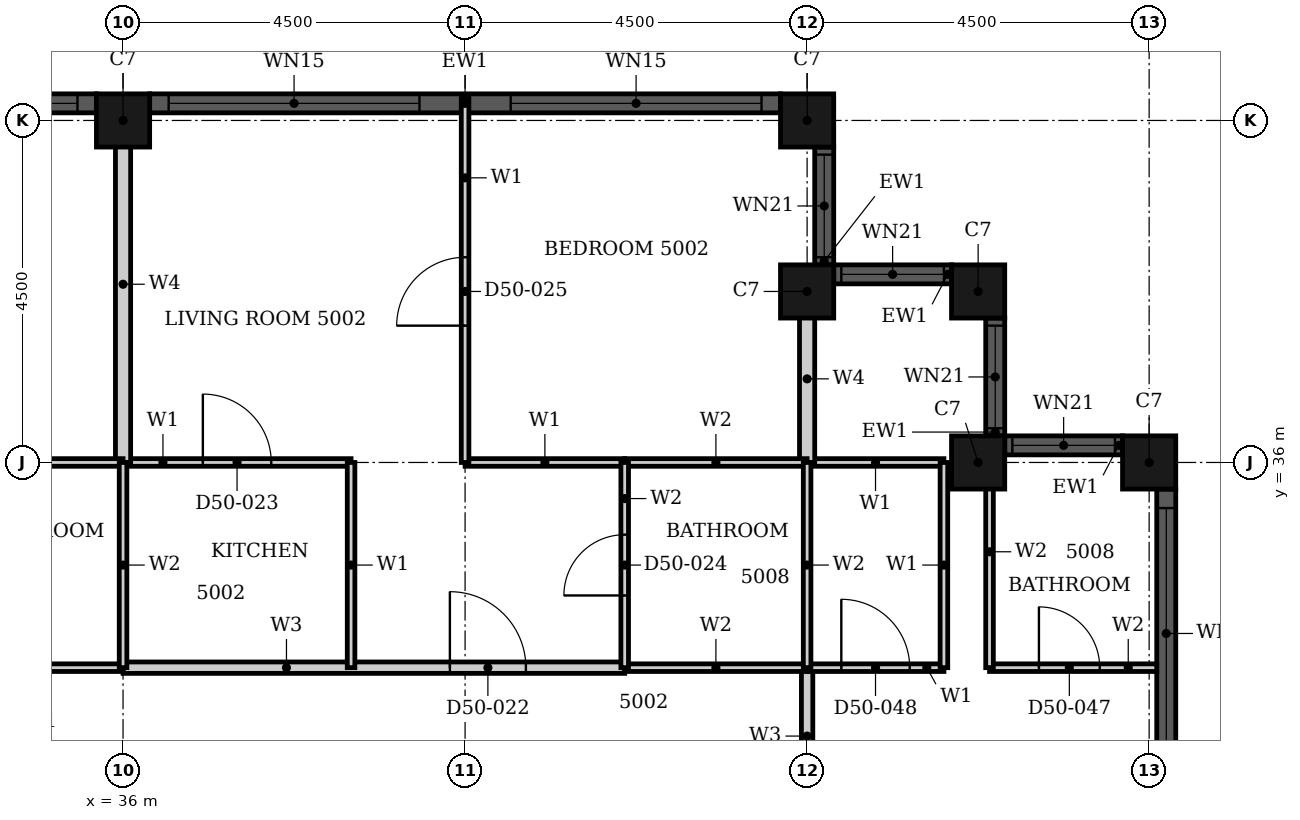
"""IFC4 building model, lengths in metres.
Left out: names, types, materials, properties, quantities, classifications, styles, units other than length and angle.
Written with IfcOpenShell. Run it as: python <this file> out.ifc"""

import sys

from ifc_helpers import new_model, si_unit, direction, frame, frame_2d, origin, origin_2d, place, context, subcontext, project, spatial, rectangle, hollow_rectangle, extrude, element, fill, save


model = new_model("IFC4")
c1 = context("Model", 3, precision=1e-05, world=origin(), true_north=direction((0.0, 1.0)))
c2 = subcontext(c1, "Body", "Model", "MODEL_VIEW")
j1 = project(units=[si_unit("LENGTHUNIT", "METRE"), si_unit("PLANEANGLEUNIT", "RADIAN")], contexts=[c1])
p1 = place(None, origin())
s1 = spatial("IfcSite", under=j1, at=p1, CompositionType="ELEMENT")
p2 = place(p1, origin())
s2 = spatial("IfcBuilding", under=s1, at=p2, CompositionType="ELEMENT")
p3 = place(p2, frame((0.0, 0.0, 199.8)))
s3 = spatial("IfcBuildingStorey", under=s2, at=p3, CompositionType="ELEMENT", Elevation=199.8)
for number, where, z_axis, x_axis in (
    (1, (49.5, 36.0, 0.0), (0.0, 0.0, 1.0), (1.0, 0.0, 0.0)),
    (2, (47.25, 36.0, 0.0), (0.0, 0.0, 1.0), (1.0, 0.0, 0.0)),
    (3, (47.25, 38.25, 0.0), (0.0, 0.0, 1.0), (1.0, 0.0, 0.0)),
    (4, (45.0, 38.25, 0.0), (0.0, 0.0, 1.0), (1.0, 0.0, 0.0)),
    (5, (45.0, 40.5, 0.0), (0.0, 0.0, 1.0), (1.0, 0.0, 0.0)),
    (6, (36.0, 40.5, 0.0), (0.0, 0.0, 1.0), (1.0, 0.0, 0.0)),
):
    element("IfcColumn", number, at=place(p3, frame(where, z_axis=z_axis, x_axis=x_axis)), inside=s3, PredefinedType="COLUMN", context=c2, shape_type="SweptSolid", body=[
        extrude(hollow_rectangle(XDim=0.7, YDim=0.7, WallThickness=0.022, at=origin_2d()), origin(), (0.0, 0.0, 1.0), 3.7),
    ])
p4 = place(p3, frame((49.725, 27.35, 0.0), z_axis=(0.0, 0.0, 1.0), x_axis=(0.0, 1.0, 0.0)))
e7 = element("IfcWall", 7, at=p4, inside=s3, PredefinedType="SOLIDWALL", context=c2, shape_type="SweptSolid", body=[
    extrude(rectangle(XDim=8.3, YDim=0.25, at=frame_2d((4.15, 0.0))), origin(), (0.0, 0.0, 1.0), 3.7),
])
p5 = place(p4, frame((0.25, 0.0, 0.45)))
e8 = element("IfcOpeningElement", 8, at=p5, cuts=e7, PredefinedType="OPENING", context=c2, shape_type="SweptSolid", body=[
    extrude(rectangle(XDim=3.3, YDim=2.3, at=frame_2d((1.65, 1.15))), frame((0.0, 0.135, 0.0), z_axis=(0.0, -1.0, 0.0), x_axis=(1.0, 0.0, 0.0)), (0.0, 0.0, 1.0), 0.27),
])
p6 = place(p4, frame((4.75, 0.0, 0.45)))
e9 = element("IfcOpeningElement", 9, at=p6, cuts=e7, PredefinedType="OPENING", context=c2, shape_type="SweptSolid", body=[
    extrude(rectangle(XDim=3.3, YDim=2.3, at=frame_2d((1.65, 1.15))), frame((0.0, 0.135, 0.0), z_axis=(0.0, -1.0, 0.0), x_axis=(1.0, 0.0, 0.0)), (0.0, 0.0, 1.0), 0.27),
])
p7 = place(p3, frame((49.15, 36.225, 0.0), z_axis=(0.0, 0.0, 1.0), x_axis=(-1.0, 0.0, 0.0)))
e10 = element("IfcWall", 10, at=p7, inside=s3, PredefinedType="SOLIDWALL", context=c2, shape_type="SweptSolid", body=[
    extrude(rectangle(XDim=1.55, YDim=0.25, at=frame_2d((0.775, 0.0))), origin(), (0.0, 0.0, 1.0), 3.7),
])
p8 = place(p7, frame((0.1, 0.0, 0.9)))
e11 = element("IfcOpeningElement", 11, at=p8, cuts=e10, PredefinedType="OPENING", context=c2, shape_type="SweptSolid", body=[
    extrude(rectangle(XDim=1.35, YDim=1.85, at=frame_2d((0.675, 0.925))), frame((0.0, 0.135, 0.0), z_axis=(0.0, -1.0, 0.0), x_axis=(1.0, 0.0, 0.0)), (0.0, 0.0, 1.0), 0.27),
])
p9 = place(p3, frame((47.475, 36.35, 0.0), z_axis=(0.0, 0.0, 1.0), x_axis=(0.0, 1.0, 0.0)))
e12 = element("IfcWall", 12, at=p9, inside=s3, PredefinedType="SOLIDWALL", context=c2, shape_type="SweptSolid", body=[
    extrude(rectangle(XDim=1.55, YDim=0.25, at=frame_2d((0.775, 0.0))), origin(), (0.0, 0.0, 1.0), 3.7),
])
p10 = place(p9, frame((0.1, 0.0, 0.9)))
e13 = element("IfcOpeningElement", 13, at=p10, cuts=e12, PredefinedType="OPENING", context=c2, shape_type="SweptSolid", body=[
    extrude(rectangle(XDim=1.35, YDim=1.85, at=frame_2d((0.675, 0.925))), frame((0.0, 0.135, 0.0), z_axis=(0.0, -1.0, 0.0), x_axis=(1.0, 0.0, 0.0)), (0.0, 0.0, 1.0), 0.27),
])
p11 = place(p3, frame((46.9, 38.475, 0.0), z_axis=(0.0, 0.0, 1.0), x_axis=(-1.0, 0.0, 0.0)))
e14 = element("IfcWall", 14, at=p11, inside=s3, PredefinedType="SOLIDWALL", context=c2, shape_type="SweptSolid", body=[
    extrude(rectangle(XDim=1.55, YDim=0.25, at=frame_2d((0.775, 0.0))), origin(), (0.0, 0.0, 1.0), 3.7),
])
p12 = place(p11, frame((0.1, 0.0, 0.9)))
e15 = element("IfcOpeningElement", 15, at=p12, cuts=e14, PredefinedType="OPENING", context=c2, shape_type="SweptSolid", body=[
    extrude(rectangle(XDim=1.35, YDim=1.85, at=frame_2d((0.675, 0.925))), frame((0.0, 0.135, 0.0), z_axis=(0.0, -1.0, 0.0), x_axis=(1.0, 0.0, 0.0)), (0.0, 0.0, 1.0), 0.27),
])
p13 = place(p3, frame((45.225, 38.6, 0.0), z_axis=(0.0, 0.0, 1.0), x_axis=(0.0, 1.0, 0.0)))
e16 = element("IfcWall", 16, at=p13, inside=s3, PredefinedType="SOLIDWALL", context=c2, shape_type="SweptSolid", body=[
    extrude(rectangle(XDim=1.55, YDim=0.25, at=frame_2d((0.775, 0.0))), origin(), (0.0, 0.0, 1.0), 3.7),
])
p14 = place(p13, frame((0.1, 0.0, 0.9)))
e17 = element("IfcOpeningElement", 17, at=p14, cuts=e16, PredefinedType="OPENING", context=c2, shape_type="SweptSolid", body=[
    extrude(rectangle(XDim=1.35, YDim=1.85, at=frame_2d((0.675, 0.925))), frame((0.0, 0.135, 0.0), z_axis=(0.0, -1.0, 0.0), x_axis=(1.0, 0.0, 0.0)), (0.0, 0.0, 1.0), 0.27),
])
p15 = place(p3, frame((44.65, 40.725, 0.0), z_axis=(0.0, 0.0, 1.0), x_axis=(-1.0, 0.0, 0.0)))
e18 = element("IfcWall", 18, at=p15, inside=s3, PredefinedType="SOLIDWALL", context=c2, shape_type="SweptSolid", body=[
    extrude(rectangle(XDim=8.3, YDim=0.25, at=frame_2d((4.15, 0.0))), origin(), (0.0, 0.0, 1.0), 3.7),
])
p16 = place(p15, frame((0.25, 0.0, 0.45)))
e19 = element("IfcOpeningElement", 19, at=p16, cuts=e18, PredefinedType="OPENING", context=c2, shape_type="SweptSolid", body=[
    extrude(rectangle(XDim=3.3, YDim=2.3, at=frame_2d((1.65, 1.15))), frame((0.0, 0.135, 0.0), z_axis=(0.0, -1.0, 0.0), x_axis=(1.0, 0.0, 0.0)), (0.0, 0.0, 1.0), 0.27),
])
p17 = place(p15, frame((4.75, 0.0, 0.45)))
e20 = element("IfcOpeningElement", 20, at=p17, cuts=e18, PredefinedType="OPENING", context=c2, shape_type="SweptSolid", body=[
    extrude(rectangle(XDim=3.3, YDim=2.3, at=frame_2d((1.65, 1.15))), frame((0.0, 0.135, 0.0), z_axis=(0.0, -1.0, 0.0), x_axis=(1.0, 0.0, 0.0)), (0.0, 0.0, 1.0), 0.27),
])
p18 = place(p3, frame((35.65, 40.725, 0.0), z_axis=(0.0, 0.0, 1.0), x_axis=(-1.0, 0.0, 0.0)))
e21 = element("IfcWall", 21, at=p18, inside=s3, PredefinedType="SOLIDWALL", context=c2, shape_type="SweptSolid", body=[
    extrude(rectangle(XDim=8.3, YDim=0.25, at=frame_2d((4.15, 0.0))), origin(), (0.0, 0.0, 1.0), 3.7),
])
p19 = place(p18, frame((0.25, 0.0, 0.45)))
e22 = element("IfcOpeningElement", 22, at=p19, cuts=e21, PredefinedType="OPENING", context=c2, shape_type="SweptSolid", body=[
    extrude(rectangle(XDim=3.3, YDim=2.3, at=frame_2d((1.65, 1.15))), frame((0.0, 0.135, 0.0), z_axis=(0.0, -1.0, 0.0), x_axis=(1.0, 0.0, 0.0)), (0.0, 0.0, 1.0), 0.27),
])
p20 = place(p18, frame((4.75, 0.0, 0.45)))
e23 = element("IfcOpeningElement", 23, at=p20, cuts=e21, PredefinedType="OPENING", context=c2, shape_type="SweptSolid", body=[
    extrude(rectangle(XDim=3.3, YDim=2.3, at=frame_2d((1.65, 1.15))), frame((0.0, 0.135, 0.0), z_axis=(0.0, -1.0, 0.0), x_axis=(1.0, 0.0, 0.0)), (0.0, 0.0, 1.0), 0.27),
])
p21 = place(p3, frame((36.0, 33.3, 0.0), z_axis=(0.0, 0.0, 1.0), x_axis=(1.0, 0.0, 0.0)))
e24 = element("IfcWall", 24, at=p21, inside=s3, PredefinedType="PARTITIONING", context=c2, shape_type="SweptSolid", body=[
    extrude(rectangle(XDim=6.6, YDim=0.15, at=frame_2d((3.3, 0.0))), origin(), (0.0, 0.0, 1.0), 3.4),
])
p22 = place(p21, frame((4.3, 0.0, 0.0)))
e25 = element("IfcOpeningElement", 25, at=p22, cuts=e24, PredefinedType="OPENING", context=c2, shape_type="SweptSolid", body=[
    extrude(rectangle(XDim=1.0, YDim=2.2, at=frame_2d((0.5, 1.1))), frame((0.0, 0.085, 0.0), z_axis=(0.0, -1.0, 0.0), x_axis=(1.0, 0.0, 0.0)), (0.0, 0.0, 1.0), 0.17),
])
p23 = place(p3, frame((45.0, 31.5, 0.0), z_axis=(0.0, 0.0, 1.0), x_axis=(0.0, 1.0, 0.0)))
e26 = element("IfcWall", 26, at=p23, inside=s3, PredefinedType="PARTITIONING", context=c2, shape_type="SweptSolid", body=[
    extrude(rectangle(XDim=1.8, YDim=0.15, at=frame_2d((0.9, 0.0))), origin(), (0.0, 0.0, 1.0), 3.4),
])
p24 = place(p3, frame((45.0, 33.3, 0.0), z_axis=(0.0, 0.0, 1.0), x_axis=(1.0, 0.0, 0.0)))
e27 = element("IfcWall", 27, at=p24, inside=s3, PredefinedType="PARTITIONING", context=c2, shape_type="SweptSolid", body=[
    extrude(rectangle(XDim=1.8, YDim=0.1, at=frame_2d((0.9, 0.0))), origin(), (0.0, 0.0, 1.0), 3.4),
])
p25 = place(p24, frame((0.45, 0.0, 0.0)))
e28 = element("IfcOpeningElement", 28, at=p25, cuts=e27, PredefinedType="OPENING", context=c2, shape_type="SweptSolid", body=[
    extrude(rectangle(XDim=0.9, YDim=2.1, at=frame_2d((0.45, 1.05))), frame((0.0, 0.06, 0.0), z_axis=(0.0, -1.0, 0.0), x_axis=(1.0, 0.0, 0.0)), (0.0, 0.0, 1.0), 0.12),
])
p26 = place(p3, frame((40.5, 36.0, 0.0), z_axis=(0.0, 0.0, 1.0), x_axis=(1.0, 0.0, 0.0)))
e29 = element("IfcWall", 29, at=p26, inside=s3, PredefinedType="PARTITIONING", context=c2, shape_type="SweptSolid", body=[
    extrude(rectangle(XDim=2.1, YDim=0.1, at=frame_2d((1.05, 0.0))), origin(), (0.0, 0.0, 1.0), 3.4),
])
p27 = place(p3, frame((36.0, 36.0, 0.0), z_axis=(0.0, 0.0, 1.0), x_axis=(1.0, 0.0, 0.0)))
e30 = element("IfcWall", 30, at=p27, inside=s3, PredefinedType="PARTITIONING", context=c2, shape_type="SweptSolid", body=[
    extrude(rectangle(XDim=3.0, YDim=0.1, at=frame_2d((1.5, 0.0))), origin(), (0.0, 0.0, 1.0), 3.4),
])
p28 = place(p27, frame((1.05, 0.0, 0.0)))
e31 = element("IfcOpeningElement", 31, at=p28, cuts=e30, PredefinedType="OPENING", context=c2, shape_type="SweptSolid", body=[
    extrude(rectangle(XDim=0.9, YDim=2.1, at=frame_2d((0.45, 1.05))), frame((0.0, 0.06, 0.0), z_axis=(0.0, -1.0, 0.0), x_axis=(1.0, 0.0, 0.0)), (0.0, 0.0, 1.0), 0.12),
])
p29 = place(p3, frame((45.0, 36.0, 0.0), z_axis=(0.0, 0.0, 1.0), x_axis=(1.0, 0.0, 0.0)))
e32 = element("IfcWall", 32, at=p29, inside=s3, PredefinedType="PARTITIONING", context=c2, shape_type="SweptSolid", body=[
    extrude(rectangle(XDim=1.8, YDim=0.1, at=frame_2d((0.9, 0.0))), origin(), (0.0, 0.0, 1.0), 3.4),
])
p30 = place(p3, frame((39.0, 33.3, 0.0), z_axis=(0.0, 0.0, 1.0), x_axis=(0.0, 1.0, 0.0)))
e33 = element("IfcWall", 33, at=p30, inside=s3, PredefinedType="PARTITIONING", context=c2, shape_type="SweptSolid", body=[
    extrude(rectangle(XDim=2.7, YDim=0.1, at=frame_2d((1.35, 0.0))), origin(), (0.0, 0.0, 1.0), 3.4),
])
p31 = place(p3, frame((40.5, 36.0, 0.0), z_axis=(0.0, 0.0, 1.0), x_axis=(0.0, 1.0, 0.0)))
e34 = element("IfcWall", 34, at=p31, inside=s3, PredefinedType="PARTITIONING", context=c2, shape_type="SweptSolid", body=[
    extrude(rectangle(XDim=4.79, YDim=0.1, at=frame_2d((2.395, 0.0))), origin(), (0.0, 0.0, 1.0), 3.4),
])
p32 = place(p31, frame((1.8, 0.0, 0.0)))
e35 = element("IfcOpeningElement", 35, at=p32, cuts=e34, PredefinedType="OPENING", context=c2, shape_type="SweptSolid", body=[
    extrude(rectangle(XDim=0.9, YDim=2.1, at=frame_2d((0.45, 1.05))), frame((0.0, 0.06, 0.0), z_axis=(0.0, -1.0, 0.0), x_axis=(1.0, 0.0, 0.0)), (0.0, 0.0, 1.0), 0.12),
])
p33 = place(p3, frame((46.8, 33.3, 0.0), z_axis=(0.0, 0.0, 1.0), x_axis=(0.0, 1.0, 0.0)))
e36 = element("IfcWall", 36, at=p33, inside=s3, PredefinedType="PARTITIONING", context=c2, shape_type="SweptSolid", body=[
    extrude(rectangle(XDim=2.7, YDim=0.1, at=frame_2d((1.35, 0.0))), origin(), (0.0, 0.0, 1.0), 3.4),
])
p34 = place(p3, frame((36.0, 36.0, 0.0), z_axis=(0.0, 0.0, 1.0), x_axis=(0.0, 1.0, 0.0)))
e37 = element("IfcWall", 37, at=p34, inside=s3, PredefinedType="PARTITIONING", context=c2, shape_type="SweptSolid", body=[
    extrude(rectangle(XDim=4.69, YDim=0.2, at=frame_2d((2.345, 0.0))), origin(), (0.0, 0.0, 1.0), 3.4),
])
p35 = place(p3, frame((45.0, 36.0, 0.0), z_axis=(0.0, 0.0, 1.0), x_axis=(0.0, 1.0, 0.0)))
e38 = element("IfcWall", 38, at=p35, inside=s3, PredefinedType="PARTITIONING", context=c2, shape_type="SweptSolid", body=[
    extrude(rectangle(XDim=2.2, YDim=0.2, at=frame_2d((1.1, 0.0))), origin(), (0.0, 0.0, 1.0), 3.4),
])
for number, where, z_axis, x_axis in (
    (39, (33.6, 33.3, 0.0), (0.0, 0.0, 1.0), (1.0, 0.0, 0.0)),
    (40, (42.6, 33.3, 0.0), (0.0, 0.0, 1.0), (1.0, 0.0, 0.0)),
):
    element("IfcWall", number, at=place(p3, frame(where, z_axis=z_axis, x_axis=x_axis)), inside=s3, PredefinedType="PARTITIONING", context=c2, shape_type="SweptSolid", body=[
        extrude(rectangle(XDim=2.4, YDim=0.1, at=frame_2d((1.2, 0.0))), origin(), (0.0, 0.0, 1.0), 3.4),
    ])
p36 = place(p3, frame((47.4, 33.3, 0.0), z_axis=(0.0, 0.0, 1.0), x_axis=(1.0, 0.0, 0.0)))
e41 = element("IfcWall", 41, at=p36, inside=s3, PredefinedType="PARTITIONING", context=c2, shape_type="SweptSolid", body=[
    extrude(rectangle(XDim=2.2, YDim=0.1, at=frame_2d((1.1, 0.0))), origin(), (0.0, 0.0, 1.0), 3.4),
])
p37 = place(p36, frame((0.65, 0.0, 0.0)))
e42 = element("IfcOpeningElement", 42, at=p37, cuts=e41, PredefinedType="OPENING", context=c2, shape_type="SweptSolid", body=[
    extrude(rectangle(XDim=0.8, YDim=2.1, at=frame_2d((0.4, 1.05))), frame((0.0, 0.06, 0.0), z_axis=(0.0, -1.0, 0.0), x_axis=(1.0, 0.0, 0.0)), (0.0, 0.0, 1.0), 0.12),
])
for number, where, z_axis, x_axis in (
    (43, (33.6, 36.0, 0.0), (0.0, 0.0, 1.0), (1.0, 0.0, 0.0)),
    (44, (42.6, 36.0, 0.0), (0.0, 0.0, 1.0), (1.0, 0.0, 0.0)),
):
    element("IfcWall", number, at=place(p3, frame(where, z_axis=z_axis, x_axis=x_axis)), inside=s3, PredefinedType="PARTITIONING", context=c2, shape_type="SweptSolid", body=[
        extrude(rectangle(XDim=2.4, YDim=0.1, at=frame_2d((1.2, 0.0))), origin(), (0.0, 0.0, 1.0), 3.4),
    ])
p38 = place(p3, frame((36.0, 33.3, 0.0), z_axis=(0.0, 0.0, 1.0), x_axis=(0.0, 1.0, 0.0)))
e45 = element("IfcWall", 45, at=p38, inside=s3, PredefinedType="PARTITIONING", context=c2, shape_type="SweptSolid", body=[
    extrude(rectangle(XDim=2.7, YDim=0.1, at=frame_2d((1.35, 0.0))), origin(), (0.0, 0.0, 1.0), 3.4),
])
p39 = place(p3, frame((42.6, 33.3, 0.0), z_axis=(0.0, 0.0, 1.0), x_axis=(0.0, 1.0, 0.0)))
e46 = element("IfcWall", 46, at=p39, inside=s3, PredefinedType="PARTITIONING", context=c2, shape_type="SweptSolid", body=[
    extrude(rectangle(XDim=2.7, YDim=0.1, at=frame_2d((1.35, 0.0))), origin(), (0.0, 0.0, 1.0), 3.4),
])
p40 = place(p39, frame((0.95, 0.0, 0.0)))
e47 = element("IfcOpeningElement", 47, at=p40, cuts=e46, PredefinedType="OPENING", context=c2, shape_type="SweptSolid", body=[
    extrude(rectangle(XDim=0.8, YDim=2.1, at=frame_2d((0.4, 1.05))), frame((0.0, 0.06, 0.0), z_axis=(0.0, -1.0, 0.0), x_axis=(1.0, 0.0, 0.0)), (0.0, 0.0, 1.0), 0.12),
])
p41 = place(p3, frame((45.0, 33.3, 0.0), z_axis=(0.0, 0.0, 1.0), x_axis=(0.0, 1.0, 0.0)))
e48 = element("IfcWall", 48, at=p41, inside=s3, PredefinedType="PARTITIONING", context=c2, shape_type="SweptSolid", body=[
    extrude(rectangle(XDim=2.7, YDim=0.1, at=frame_2d((1.35, 0.0))), origin(), (0.0, 0.0, 1.0), 3.4),
])
p42 = place(p3, frame((47.4, 33.3, 0.0), z_axis=(0.0, 0.0, 1.0), x_axis=(0.0, 1.0, 0.0)))
e49 = element("IfcWall", 49, at=p42, inside=s3, PredefinedType="PARTITIONING", context=c2, shape_type="SweptSolid", body=[
    extrude(rectangle(XDim=3.05, YDim=0.1, at=frame_2d((1.525, 0.0))), origin(), (0.0, 0.0, 1.0), 3.4),
])
p43 = place(p6, origin())
e50 = element("IfcWindow", 50, at=p43, inside=s3, PartitioningType="SINGLE_PANEL", PredefinedType="WINDOW", context=c2, shape_type="SweptSolid", body=[
    extrude(rectangle(XDim=3.3, YDim=2.3, at=frame_2d((1.65, 1.15))), frame((0.0, 0.03, 0.0), z_axis=(0.0, -1.0, 0.0), x_axis=(1.0, 0.0, 0.0)), (0.0, 0.0, 1.0), 0.06),
])
fill(e9, e50)
p44 = place(p8, origin())
e51 = element("IfcWindow", 51, at=p44, inside=s3, PartitioningType="SINGLE_PANEL", PredefinedType="WINDOW", context=c2, shape_type="SweptSolid", body=[
    extrude(rectangle(XDim=1.35, YDim=1.85, at=frame_2d((0.675, 0.925))), frame((0.0, 0.03, 0.0), z_axis=(0.0, -1.0, 0.0), x_axis=(1.0, 0.0, 0.0)), (0.0, 0.0, 1.0), 0.06),
])
fill(e11, e51)
p45 = place(p10, origin())
e52 = element("IfcWindow", 52, at=p45, inside=s3, PartitioningType="SINGLE_PANEL", PredefinedType="WINDOW", context=c2, shape_type="SweptSolid", body=[
    extrude(rectangle(XDim=1.35, YDim=1.85, at=frame_2d((0.675, 0.925))), frame((0.0, 0.03, 0.0), z_axis=(0.0, -1.0, 0.0), x_axis=(1.0, 0.0, 0.0)), (0.0, 0.0, 1.0), 0.06),
])
fill(e13, e52)
p46 = place(p12, origin())
e53 = element("IfcWindow", 53, at=p46, inside=s3, PartitioningType="SINGLE_PANEL", PredefinedType="WINDOW", context=c2, shape_type="SweptSolid", body=[
    extrude(rectangle(XDim=1.35, YDim=1.85, at=frame_2d((0.675, 0.925))), frame((0.0, 0.03, 0.0), z_axis=(0.0, -1.0, 0.0), x_axis=(1.0, 0.0, 0.0)), (0.0, 0.0, 1.0), 0.06),
])
fill(e15, e53)
p47 = place(p14, origin())
e54 = element("IfcWindow", 54, at=p47, inside=s3, PartitioningType="SINGLE_PANEL", PredefinedType="WINDOW", context=c2, shape_type="SweptSolid", body=[
    extrude(rectangle(XDim=1.35, YDim=1.85, at=frame_2d((0.675, 0.925))), frame((0.0, 0.03, 0.0), z_axis=(0.0, -1.0, 0.0), x_axis=(1.0, 0.0, 0.0)), (0.0, 0.0, 1.0), 0.06),
])
fill(e17, e54)
p48 = place(p16, origin())
e55 = element("IfcWindow", 55, at=p48, inside=s3, PartitioningType="SINGLE_PANEL", PredefinedType="WINDOW", context=c2, shape_type="SweptSolid", body=[
    extrude(rectangle(XDim=3.3, YDim=2.3, at=frame_2d((1.65, 1.15))), frame((0.0, 0.03, 0.0), z_axis=(0.0, -1.0, 0.0), x_axis=(1.0, 0.0, 0.0)), (0.0, 0.0, 1.0), 0.06),
])
fill(e19, e55)
p49 = place(p17, origin())
e56 = element("IfcWindow", 56, at=p49, inside=s3, PartitioningType="SINGLE_PANEL", PredefinedType="WINDOW", context=c2, shape_type="SweptSolid", body=[
    extrude(rectangle(XDim=3.3, YDim=2.3, at=frame_2d((1.65, 1.15))), frame((0.0, 0.03, 0.0), z_axis=(0.0, -1.0, 0.0), x_axis=(1.0, 0.0, 0.0)), (0.0, 0.0, 1.0), 0.06),
])
fill(e20, e56)
p50 = place(p19, origin())
e57 = element("IfcWindow", 57, at=p50, inside=s3, PartitioningType="SINGLE_PANEL", PredefinedType="WINDOW", context=c2, shape_type="SweptSolid", body=[
    extrude(rectangle(XDim=3.3, YDim=2.3, at=frame_2d((1.65, 1.15))), frame((0.0, 0.03, 0.0), z_axis=(0.0, -1.0, 0.0), x_axis=(1.0, 0.0, 0.0)), (0.0, 0.0, 1.0), 0.06),
])
fill(e22, e57)
p51 = place(p22, origin())
e58 = element("IfcDoor", 58, at=p51, inside=s3, OperationType="SINGLE_SWING_LEFT", PredefinedType="DOOR", context=c2, shape_type="SweptSolid", body=[
    extrude(rectangle(XDim=1.0, YDim=2.2, at=frame_2d((0.5, 1.1))), frame((0.0, 0.025, 0.0), z_axis=(0.0, -1.0, 0.0), x_axis=(1.0, 0.0, 0.0)), (0.0, 0.0, 1.0), 0.05),
])
fill(e25, e58)
p52 = place(p28, origin())
e59 = element("IfcDoor", 59, at=p52, inside=s3, OperationType="SINGLE_SWING_LEFT", PredefinedType="DOOR", context=c2, shape_type="SweptSolid", body=[
    extrude(rectangle(XDim=0.9, YDim=2.1, at=frame_2d((0.45, 1.05))), frame((0.0, 0.025, 0.0), z_axis=(0.0, -1.0, 0.0), x_axis=(1.0, 0.0, 0.0)), (0.0, 0.0, 1.0), 0.05),
])
fill(e31, e59)
p53 = place(p40, origin())
e60 = element("IfcDoor", 60, at=p53, inside=s3, OperationType="SINGLE_SWING_RIGHT", PredefinedType="DOOR", context=c2, shape_type="SweptSolid", body=[
    extrude(rectangle(XDim=0.8, YDim=2.1, at=frame_2d((0.4, 1.05))), frame((0.0, 0.025, 0.0), z_axis=(0.0, -1.0, 0.0), x_axis=(1.0, 0.0, 0.0)), (0.0, 0.0, 1.0), 0.05),
])
fill(e47, e60)
p54 = place(p32, origin())
e61 = element("IfcDoor", 61, at=p54, inside=s3, OperationType="SINGLE_SWING_RIGHT", PredefinedType="DOOR", context=c2, shape_type="SweptSolid", body=[
    extrude(rectangle(XDim=0.9, YDim=2.1, at=frame_2d((0.45, 1.05))), frame((0.0, 0.025, 0.0), z_axis=(0.0, -1.0, 0.0), x_axis=(1.0, 0.0, 0.0)), (0.0, 0.0, 1.0), 0.05),
])
fill(e35, e61)
p55 = place(p37, origin())
e62 = element("IfcDoor", 62, at=p55, inside=s3, OperationType="SINGLE_SWING_RIGHT", PredefinedType="DOOR", context=c2, shape_type="SweptSolid", body=[
    extrude(rectangle(XDim=0.8, YDim=2.1, at=frame_2d((0.4, 1.05))), frame((0.0, 0.025, 0.0), z_axis=(0.0, -1.0, 0.0), x_axis=(1.0, 0.0, 0.0)), (0.0, 0.0, 1.0), 0.05),
])
fill(e42, e62)
p56 = place(p25, origin())
e63 = element("IfcDoor", 63, at=p56, inside=s3, OperationType="SINGLE_SWING_LEFT", PredefinedType="DOOR", context=c2, shape_type="SweptSolid", body=[
    extrude(rectangle(XDim=0.9, YDim=2.1, at=frame_2d((0.45, 1.05))), frame((0.0, 0.025, 0.0), z_axis=(0.0, -1.0, 0.0), x_axis=(1.0, 0.0, 0.0)), (0.0, 0.0, 1.0), 0.05),
])
fill(e28, e63)
save(model, sys.argv[1])
